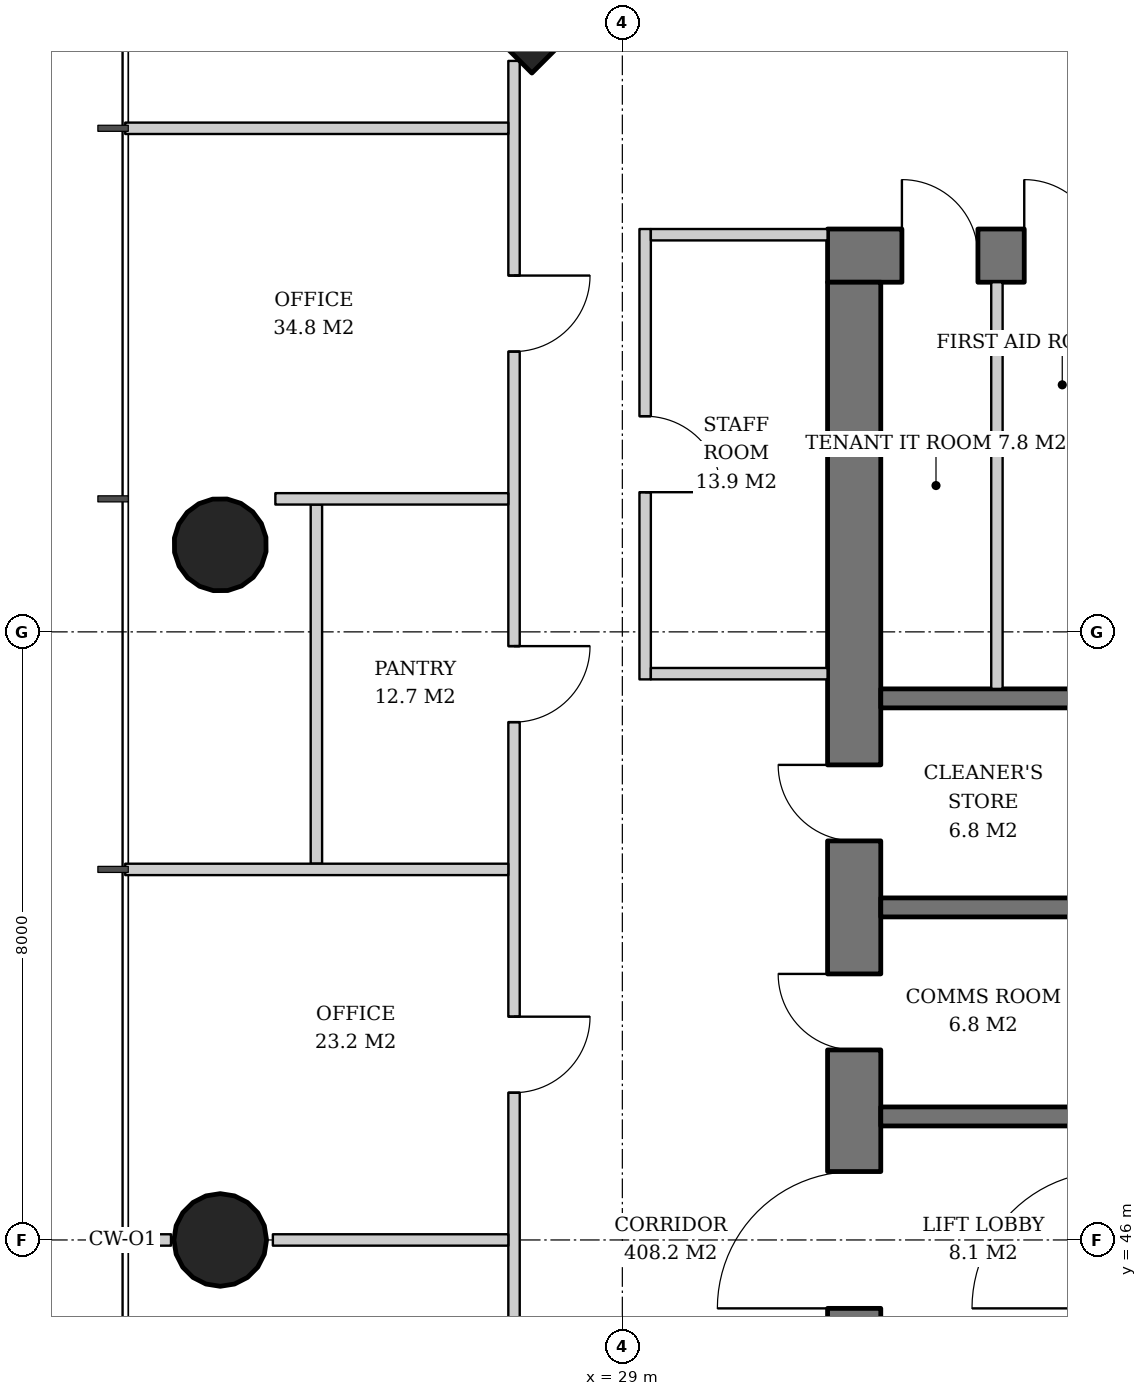
"""IFC4 building model, lengths in metres.
Left out: names, types, materials, properties, quantities, classifications, styles, units other than length and angle.
Written with IfcOpenShell. Run it as: python <this file> out.ifc"""

import sys

from ifc_helpers import new_model, si_unit, direction, frame, frame_2d, origin, origin_2d, place, context, subcontext, project, spatial, rectangle, hollow_circle, extrude, element, fill, save


model = new_model("IFC4")
c1 = context("Model", 3, precision=1e-05, world=origin(), true_north=direction((0.0, 1.0)))
c2 = subcontext(c1, "Body", "Model", "MODEL_VIEW")
j1 = project(units=[si_unit("LENGTHUNIT", "METRE"), si_unit("PLANEANGLEUNIT", "RADIAN")], contexts=[c1])
p1 = place(None, origin())
s1 = spatial("IfcSite", under=j1, at=p1, CompositionType="ELEMENT")
p2 = place(p1, origin())
s2 = spatial("IfcBuilding", under=s1, at=p2, CompositionType="ELEMENT")
p3 = place(p2, frame((0.0, 0.0, 104.6)))
s3 = spatial("IfcBuildingStorey", under=s2, at=p3, CompositionType="ELEMENT", Elevation=104.6)
p4 = place(p3, frame((27.771, 63.229, 0.0), z_axis=(0.031900153262, -0.031900153262, 0.998981861919), x_axis=(0.707106781187, 0.707106781187, 0.0)))
e1 = element("IfcColumn", 1, at=p4, inside=s3, PredefinedType="COLUMN", context=c2, shape_type="SweptSolid", body=[
    extrude(rectangle(XDim=2.6, YDim=2.6, at=origin_2d()), origin(), (0.0, 0.0, 1.0), 3.804),
])
p5 = place(p3, frame((23.671, 55.164, 0.0), z_axis=(0.031976461511, -0.015988230756, 0.999360736865), x_axis=(0.4472135955, 0.894427191, 0.0)))
e2 = element("IfcColumn", 2, at=p5, inside=s3, PredefinedType="COLUMN", context=c2, shape_type="SweptSolid", body=[
    extrude(hollow_circle(Radius=0.61, WallThickness=0.04, at=origin_2d()), origin(), (0.0, 0.0, 1.0), 3.802),
])
p6 = place(p3, frame((23.671, 46.0, 0.0), z_axis=(0.031980549263, 0.0, 0.999488491414), x_axis=(0.0, 1.0, 0.0)))
e3 = element("IfcColumn", 3, at=p6, inside=s3, PredefinedType="COLUMN", context=c2, shape_type="SweptSolid", body=[
    extrude(hollow_circle(Radius=0.61, WallThickness=0.04, at=origin_2d()), origin(), (0.0, 0.0, 1.0), 3.802),
])
p7 = place(p3, frame((31.7, 58.95, 0.0), z_axis=(0.0, 0.0, 1.0), x_axis=(1.0, 0.0, 0.0)))
e4 = element("IfcWall", 4, at=p7, inside=s3, PredefinedType="SHEAR", context=c2, shape_type="SweptSolid", body=[
    extrude(rectangle(XDim=26.6, YDim=0.7, at=frame_2d((13.3, 0.0))), origin(), (0.0, 0.0, 1.0), 3.8),
])
p8 = place(p7, frame((17.94, 0.0, 0.0)))
e5 = element("IfcOpeningElement", 5, at=p8, cuts=e4, PredefinedType="OPENING", context=c2, shape_type="SweptSolid", body=[
    extrude(rectangle(XDim=1.0, YDim=2.1, at=frame_2d((0.5, 1.05))), frame((0.0, 0.36, 0.0), z_axis=(0.0, -1.0, 0.0), x_axis=(1.0, 0.0, 0.0)), (0.0, 0.0, 1.0), 0.72),
])
p9 = place(p7, frame((5.825, 0.0, 0.0)))
e6 = element("IfcOpeningElement", 6, at=p9, cuts=e4, PredefinedType="OPENING", context=c2, shape_type="SweptSolid", body=[
    extrude(rectangle(XDim=1.0, YDim=2.1, at=frame_2d((0.5, 1.05))), frame((0.0, 0.36, 0.0), z_axis=(0.0, -1.0, 0.0), x_axis=(1.0, 0.0, 0.0)), (0.0, 0.0, 1.0), 0.72),
])
p10 = place(p7, frame((0.978, 0.0, 0.0)))
e7 = element("IfcOpeningElement", 7, at=p10, cuts=e4, PredefinedType="OPENING", context=c2, shape_type="SweptSolid", body=[
    extrude(rectangle(XDim=1.0, YDim=2.1, at=frame_2d((0.5, 1.05))), frame((0.0, 0.36, 0.0), z_axis=(0.0, -1.0, 0.0), x_axis=(1.0, 0.0, 0.0)), (0.0, 0.0, 1.0), 0.72),
])
p11 = place(p7, frame((2.587, 0.0, 0.0)))
e8 = element("IfcOpeningElement", 8, at=p11, cuts=e4, PredefinedType="OPENING", context=c2, shape_type="SweptSolid", body=[
    extrude(rectangle(XDim=1.0, YDim=2.1, at=frame_2d((0.5, 1.05))), frame((0.0, 0.36, 0.0), z_axis=(0.0, -1.0, 0.0), x_axis=(1.0, 0.0, 0.0)), (0.0, 0.0, 1.0), 0.72),
])
p12 = place(p7, frame((4.211, 0.0, 0.0)))
e9 = element("IfcOpeningElement", 9, at=p12, cuts=e4, PredefinedType="OPENING", context=c2, shape_type="SweptSolid", body=[
    extrude(rectangle(XDim=1.0, YDim=2.1, at=frame_2d((0.5, 1.05))), frame((0.0, 0.36, 0.0), z_axis=(0.0, -1.0, 0.0), x_axis=(1.0, 0.0, 0.0)), (0.0, 0.0, 1.0), 0.72),
])
p13 = place(p7, frame((9.126, 0.0, 0.0)))
e10 = element("IfcOpeningElement", 10, at=p13, cuts=e4, PredefinedType="OPENING", context=c2, shape_type="SweptSolid", body=[
    extrude(rectangle(XDim=1.0, YDim=2.1, at=frame_2d((0.5, 1.05))), frame((0.0, 0.36, 0.0), z_axis=(0.0, -1.0, 0.0), x_axis=(1.0, 0.0, 0.0)), (0.0, 0.0, 1.0), 0.72),
])
p14 = place(p7, frame((14.029, 0.0, 0.0)))
e11 = element("IfcOpeningElement", 11, at=p14, cuts=e4, PredefinedType="OPENING", context=c2, shape_type="SweptSolid", body=[
    extrude(rectangle(XDim=1.0, YDim=2.1, at=frame_2d((0.5, 1.05))), frame((0.0, 0.36, 0.0), z_axis=(0.0, -1.0, 0.0), x_axis=(1.0, 0.0, 0.0)), (0.0, 0.0, 1.0), 0.72),
])
p15 = place(p7, frame((22.4, 0.0, 0.0)))
e12 = element("IfcOpeningElement", 12, at=p15, cuts=e4, PredefinedType="OPENING", context=c2, shape_type="SweptSolid", body=[
    extrude(rectangle(XDim=1.0, YDim=2.1, at=frame_2d((0.5, 1.05))), frame((0.0, 0.36, 0.0), z_axis=(0.0, -1.0, 0.0), x_axis=(1.0, 0.0, 0.0)), (0.0, 0.0, 1.0), 0.72),
])
p16 = place(p3, frame((32.05, 33.4, 0.0), z_axis=(0.0, 0.0, 1.0), x_axis=(0.0, 1.0, 0.0)))
e13 = element("IfcWall", 13, at=p16, inside=s3, PredefinedType="SHEAR", context=c2, shape_type="SweptSolid", body=[
    extrude(rectangle(XDim=25.2, YDim=0.7, at=frame_2d((12.6, 0.0))), origin(), (0.0, 0.0, 1.0), 3.8),
])
p17 = place(p16, frame((11.7, 0.0, 0.0)))
e14 = element("IfcOpeningElement", 14, at=p17, cuts=e13, PredefinedType="OPENING", context=c2, shape_type="SweptSolid", body=[
    extrude(rectangle(XDim=1.8, YDim=2.4, at=frame_2d((0.9, 1.2))), frame((0.0, 0.36, 0.0), z_axis=(0.0, -1.0, 0.0), x_axis=(1.0, 0.0, 0.0)), (0.0, 0.0, 1.0), 0.72),
])
p18 = place(p16, frame((3.6, 0.0, 0.0)))
e15 = element("IfcOpeningElement", 15, at=p18, cuts=e13, PredefinedType="OPENING", context=c2, shape_type="SweptSolid", body=[
    extrude(rectangle(XDim=1.0, YDim=2.1, at=frame_2d((0.5, 1.05))), frame((0.0, 0.36, 0.0), z_axis=(0.0, -1.0, 0.0), x_axis=(1.0, 0.0, 0.0)), (0.0, 0.0, 1.0), 0.72),
])
p19 = place(p16, frame((6.35, 0.0, 0.0)))
e16 = element("IfcOpeningElement", 16, at=p19, cuts=e13, PredefinedType="OPENING", context=c2, shape_type="SweptSolid", body=[
    extrude(rectangle(XDim=1.0, YDim=2.1, at=frame_2d((0.5, 1.05))), frame((0.0, 0.36, 0.0), z_axis=(0.0, -1.0, 0.0), x_axis=(1.0, 0.0, 0.0)), (0.0, 0.0, 1.0), 0.72),
])
p20 = place(p16, frame((9.1, 0.0, 0.0)))
e17 = element("IfcOpeningElement", 17, at=p20, cuts=e13, PredefinedType="OPENING", context=c2, shape_type="SweptSolid", body=[
    extrude(rectangle(XDim=1.0, YDim=2.1, at=frame_2d((0.5, 1.05))), frame((0.0, 0.36, 0.0), z_axis=(0.0, -1.0, 0.0), x_axis=(1.0, 0.0, 0.0)), (0.0, 0.0, 1.0), 0.72),
])
p21 = place(p16, frame((15.1, 0.0, 0.0)))
e18 = element("IfcOpeningElement", 18, at=p21, cuts=e13, PredefinedType="OPENING", context=c2, shape_type="SweptSolid", body=[
    extrude(rectangle(XDim=1.0, YDim=2.1, at=frame_2d((0.5, 1.05))), frame((0.0, 0.36, 0.0), z_axis=(0.0, -1.0, 0.0), x_axis=(1.0, 0.0, 0.0)), (0.0, 0.0, 1.0), 0.72),
])
p22 = place(p16, frame((17.85, 0.0, 0.0)))
e19 = element("IfcOpeningElement", 19, at=p22, cuts=e13, PredefinedType="OPENING", context=c2, shape_type="SweptSolid", body=[
    extrude(rectangle(XDim=1.0, YDim=2.1, at=frame_2d((0.5, 1.05))), frame((0.0, 0.36, 0.0), z_axis=(0.0, -1.0, 0.0), x_axis=(1.0, 0.0, 0.0)), (0.0, 0.0, 1.0), 0.72),
])
for number, where, z_axis, x_axis in (
    (20, (32.4, 47.625, 0.0), (0.0, 0.0, 1.0), (1.0, 0.0, 0.0)),
    (21, (32.4, 50.375, 0.0), (0.0, 0.0, 1.0), (1.0, 0.0, 0.0)),
    (22, (32.4, 53.125, 0.0), (0.0, 0.0, 1.0), (1.0, 0.0, 0.0)),
):
    element("IfcWall", number, at=place(p3, frame(where, z_axis=z_axis, x_axis=x_axis)), inside=s3, PredefinedType="SHEAR", context=c2, shape_type="SweptSolid", body=[
        extrude(rectangle(XDim=2.7, YDim=0.25, at=frame_2d((1.35, 0.0))), origin(), (0.0, 0.0, 1.0), 3.8),
    ])
p23 = place(p3, frame((33.928, 53.25, 0.0), z_axis=(0.0, 0.0, 1.0), x_axis=(0.0, 1.0, 0.0)))
e23 = element("IfcWall", 23, at=p23, inside=s3, PredefinedType="SOLIDWALL", context=c2, shape_type="SweptSolid", body=[
    extrude(rectangle(XDim=5.35, YDim=0.15, at=frame_2d((2.675, 0.0))), origin(), (0.0, 0.0, 1.0), 3.62),
])
p24 = place(p3, frame((29.3, 59.3, 0.0), z_axis=(0.0, 0.0, 1.0), x_axis=(0.0, -1.0, 0.0)))
e24 = element("IfcWall", 24, at=p24, inside=s3, PredefinedType="PARTITIONING", context=c2, shape_type="SweptSolid", body=[
    extrude(rectangle(XDim=5.925, YDim=0.15, at=frame_2d((2.962, 0.0))), origin(), (0.0, 0.0, 1.0), 2.72),
])
p25 = place(p24, frame((2.462, 0.0, 0.0)))
e25 = element("IfcOpeningElement", 25, at=p25, cuts=e24, PredefinedType="OPENING", context=c2, shape_type="SweptSolid", body=[
    extrude(rectangle(XDim=1.0, YDim=2.1, at=frame_2d((0.5, 1.05))), frame((0.0, 0.085, 0.0), z_axis=(0.0, -1.0, 0.0), x_axis=(1.0, 0.0, 0.0)), (0.0, 0.0, 1.0), 0.17),
])
for number, where, z_axis, x_axis in (
    (26, (31.7, 59.225, 0.0), (0.0, 0.0, 1.0), (-1.0, 0.0, 0.0)),
    (27, (31.7, 53.45, 0.0), (0.0, 0.0, 1.0), (-1.0, 0.0, 0.0)),
):
    element("IfcWall", number, at=place(p3, frame(where, z_axis=z_axis, x_axis=x_axis)), inside=s3, PredefinedType="PARTITIONING", context=c2, shape_type="SweptSolid", body=[
        extrude(rectangle(XDim=2.325, YDim=0.15, at=frame_2d((1.163, 0.0))), origin(), (0.0, 0.0, 1.0), 3.62),
    ])
p26 = place(p3, frame((24.975, 55.675, 0.0), z_axis=(0.0, 0.0, 1.0), x_axis=(0.0, -1.0, 0.0)))
e28 = element("IfcWall", 28, at=p26, inside=s3, PredefinedType="PARTITIONING", context=c2, shape_type="SweptSolid", body=[
    extrude(rectangle(XDim=4.725, YDim=0.15, at=frame_2d((2.363, 0.0))), origin(), (0.0, 0.0, 1.0), 2.858),
])
p27 = place(p3, frame((27.575, 61.511, 0.0), z_axis=(0.0, 0.0, 1.0), x_axis=(0.0, -1.0, 0.0)))
e29 = element("IfcWall", 29, at=p27, inside=s3, PredefinedType="PARTITIONING", context=c2, shape_type="SweptSolid", body=[
    extrude(rectangle(XDim=31.023, YDim=0.15, at=frame_2d((15.511, 0.0))), origin(), (0.0, 0.0, 1.0), 2.72),
])
p28 = place(p27, frame((2.824, 0.0, 0.0)))
e30 = element("IfcOpeningElement", 30, at=p28, cuts=e29, PredefinedType="OPENING", context=c2, shape_type="SweptSolid", body=[
    extrude(rectangle(XDim=1.0, YDim=2.1, at=frame_2d((0.5, 1.05))), frame((0.0, 0.085, 0.0), z_axis=(0.0, -1.0, 0.0), x_axis=(1.0, 0.0, 0.0)), (0.0, 0.0, 1.0), 0.17),
])
p29 = place(p27, frame((7.699, 0.0, 0.0)))
e31 = element("IfcOpeningElement", 31, at=p29, cuts=e29, PredefinedType="OPENING", context=c2, shape_type="SweptSolid", body=[
    extrude(rectangle(XDim=1.0, YDim=2.1, at=frame_2d((0.5, 1.05))), frame((0.0, 0.085, 0.0), z_axis=(0.0, -1.0, 0.0), x_axis=(1.0, 0.0, 0.0)), (0.0, 0.0, 1.0), 0.17),
])
p30 = place(p27, frame((12.574, 0.0, 0.0)))
e32 = element("IfcOpeningElement", 32, at=p30, cuts=e29, PredefinedType="OPENING", context=c2, shape_type="SweptSolid", body=[
    extrude(rectangle(XDim=1.0, YDim=2.1, at=frame_2d((0.5, 1.05))), frame((0.0, 0.085, 0.0), z_axis=(0.0, -1.0, 0.0), x_axis=(1.0, 0.0, 0.0)), (0.0, 0.0, 1.0), 0.17),
])
p31 = place(p27, frame((17.549, 0.0, 0.0)))
e33 = element("IfcOpeningElement", 33, at=p31, cuts=e29, PredefinedType="OPENING", context=c2, shape_type="SweptSolid", body=[
    extrude(rectangle(XDim=0.8, YDim=2.1, at=frame_2d((0.4, 1.05))), frame((0.0, 0.085, 0.0), z_axis=(0.0, -1.0, 0.0), x_axis=(1.0, 0.0, 0.0)), (0.0, 0.0, 1.0), 0.17),
])
p32 = place(p27, frame((22.324, 0.0, 0.0)))
e34 = element("IfcOpeningElement", 34, at=p32, cuts=e29, PredefinedType="OPENING", context=c2, shape_type="SweptSolid", body=[
    extrude(rectangle(XDim=1.0, YDim=2.1, at=frame_2d((0.5, 1.05))), frame((0.0, 0.085, 0.0), z_axis=(0.0, -1.0, 0.0), x_axis=(1.0, 0.0, 0.0)), (0.0, 0.0, 1.0), 0.17),
])
p33 = place(p27, frame((27.299, 0.0, 0.0)))
e35 = element("IfcOpeningElement", 35, at=p33, cuts=e29, PredefinedType="OPENING", context=c2, shape_type="SweptSolid", body=[
    extrude(rectangle(XDim=0.8, YDim=2.1, at=frame_2d((0.4, 1.05))), frame((0.0, 0.085, 0.0), z_axis=(0.0, -1.0, 0.0), x_axis=(1.0, 0.0, 0.0)), (0.0, 0.0, 1.0), 0.17),
])
p34 = place(p3, frame((27.5, 60.625, 0.0), z_axis=(0.0, 0.0, 1.0), x_axis=(-1.0, 0.0, 0.0)))
e36 = element("IfcWall", 36, at=p34, inside=s3, PredefinedType="PARTITIONING", context=c2, shape_type="SweptSolid", body=[
    extrude(rectangle(XDim=5.04, YDim=0.15, at=frame_2d((2.52, 0.0))), origin(), (0.0, 0.0, 1.0), 2.82),
])
p35 = place(p3, frame((27.5, 55.75, 0.0), z_axis=(0.0, 0.0, 1.0), x_axis=(-1.0, 0.0, 0.0)))
e37 = element("IfcWall", 37, at=p35, inside=s3, PredefinedType="PARTITIONING", context=c2, shape_type="SweptSolid", body=[
    extrude(rectangle(XDim=3.065, YDim=0.15, at=frame_2d((1.532, 0.0))), origin(), (0.0, 0.0, 1.0), 3.62),
])
p36 = place(p3, frame((27.5, 50.875, 0.0), z_axis=(0.0, 0.0, 1.0), x_axis=(-1.0, 0.0, 0.0)))
e38 = element("IfcWall", 38, at=p36, inside=s3, PredefinedType="PARTITIONING", context=c2, shape_type="SweptSolid", body=[
    extrude(rectangle(XDim=5.04, YDim=0.15, at=frame_2d((2.52, 0.0))), origin(), (0.0, 0.0, 1.0), 2.82),
])
p37 = place(p3, frame((27.5, 46.0, 0.0), z_axis=(0.0, 0.0, 1.0), x_axis=(-1.0, 0.0, 0.0)))
e39 = element("IfcWall", 39, at=p37, inside=s3, PredefinedType="PARTITIONING", context=c2, shape_type="SweptSolid", body=[
    extrude(rectangle(XDim=3.098, YDim=0.15, at=frame_2d((1.549, 0.0))), origin(), (0.0, 0.0, 1.0), 2.858),
])
p38 = place(p3, frame((23.062, 46.0, 0.0), z_axis=(0.0, 0.0, 1.0), x_axis=(-1.0, 0.0, 0.0)))
e40 = element("IfcWall", 40, at=p38, inside=s3, PredefinedType="PARTITIONING", context=c2, shape_type="SweptSolid", body=[
    extrude(rectangle(XDim=0.602, YDim=0.15, at=frame_2d((0.301, 0.0))), origin(), (0.0, 0.0, 1.0), 3.62),
])
p39 = place(p17, origin())
e41 = element("IfcDoor", 41, at=p39, inside=s3, OperationType="DOUBLE_DOOR_SINGLE_SWING", PredefinedType="DOOR", context=c2, shape_type="SweptSolid", body=[
    extrude(rectangle(XDim=1.8, YDim=2.4, at=frame_2d((0.9, 1.2))), frame((0.0, 0.025, 0.0), z_axis=(0.0, -1.0, 0.0), x_axis=(1.0, 0.0, 0.0)), (0.0, 0.0, 1.0), 0.05),
])
fill(e14, e41)
p40 = place(p21, origin())
e42 = element("IfcDoor", 42, at=p40, inside=s3, OperationType="SINGLE_SWING_RIGHT", PredefinedType="DOOR", context=c2, shape_type="SweptSolid", body=[
    extrude(rectangle(XDim=1.0, YDim=2.1, at=frame_2d((0.5, 1.05))), frame((0.0, -0.29, 0.0), z_axis=(0.0, -1.0, 0.0), x_axis=(1.0, 0.0, 0.0)), (0.0, 0.0, 1.0), 0.05),
])
fill(e18, e42)
p41 = place(p22, origin())
e43 = element("IfcDoor", 43, at=p41, inside=s3, OperationType="SINGLE_SWING_RIGHT", PredefinedType="DOOR", context=c2, shape_type="SweptSolid", body=[
    extrude(rectangle(XDim=1.0, YDim=2.1, at=frame_2d((0.5, 1.05))), frame((0.0, -0.29, 0.0), z_axis=(0.0, -1.0, 0.0), x_axis=(1.0, 0.0, 0.0)), (0.0, 0.0, 1.0), 0.05),
])
fill(e19, e43)
p42 = place(p10, origin())
e44 = element("IfcDoor", 44, at=p42, inside=s3, OperationType="SINGLE_SWING_LEFT", PredefinedType="DOOR", context=c2, shape_type="SweptSolid", body=[
    extrude(rectangle(XDim=1.0, YDim=2.1, at=frame_2d((0.5, 1.05))), frame((0.0, -0.29, 0.0), z_axis=(0.0, -1.0, 0.0), x_axis=(1.0, 0.0, 0.0)), (0.0, 0.0, 1.0), 0.05),
])
fill(e7, e44)
p43 = place(p11, origin())
e45 = element("IfcDoor", 45, at=p43, inside=s3, OperationType="SINGLE_SWING_LEFT", PredefinedType="DOOR", context=c2, shape_type="SweptSolid", body=[
    extrude(rectangle(XDim=1.0, YDim=2.1, at=frame_2d((0.5, 1.05))), frame((0.0, -0.29, 0.0), z_axis=(0.0, -1.0, 0.0), x_axis=(1.0, 0.0, 0.0)), (0.0, 0.0, 1.0), 0.05),
])
fill(e8, e45)
p44 = place(p25, origin())
e46 = element("IfcDoor", 46, at=p44, inside=s3, OperationType="SINGLE_SWING_RIGHT", PredefinedType="DOOR", context=c2, shape_type="SweptSolid", body=[
    extrude(rectangle(XDim=1.0, YDim=2.1, at=frame_2d((0.5, 1.05))), frame((0.0, 0.025, 0.0), z_axis=(0.0, -1.0, 0.0), x_axis=(1.0, 0.0, 0.0)), (0.0, 0.0, 1.0), 0.05),
])
fill(e25, e46)
p45 = place(p28, origin())
e47 = element("IfcDoor", 47, at=p45, inside=s3, OperationType="SINGLE_SWING_LEFT", PredefinedType="DOOR", context=c2, shape_type="SweptSolid", body=[
    extrude(rectangle(XDim=1.0, YDim=2.1, at=frame_2d((0.5, 1.05))), frame((0.0, 0.025, 0.0), z_axis=(0.0, -1.0, 0.0), x_axis=(1.0, 0.0, 0.0)), (0.0, 0.0, 1.0), 0.05),
])
fill(e30, e47)
p46 = place(p29, origin())
e48 = element("IfcDoor", 48, at=p46, inside=s3, OperationType="SINGLE_SWING_LEFT", PredefinedType="DOOR", context=c2, shape_type="SweptSolid", body=[
    extrude(rectangle(XDim=1.0, YDim=2.1, at=frame_2d((0.5, 1.05))), frame((0.0, 0.025, 0.0), z_axis=(0.0, -1.0, 0.0), x_axis=(1.0, 0.0, 0.0)), (0.0, 0.0, 1.0), 0.05),
])
fill(e31, e48)
p47 = place(p30, origin())
e49 = element("IfcDoor", 49, at=p47, inside=s3, OperationType="SINGLE_SWING_LEFT", PredefinedType="DOOR", context=c2, shape_type="SweptSolid", body=[
    extrude(rectangle(XDim=1.0, YDim=2.1, at=frame_2d((0.5, 1.05))), frame((0.0, 0.025, 0.0), z_axis=(0.0, -1.0, 0.0), x_axis=(1.0, 0.0, 0.0)), (0.0, 0.0, 1.0), 0.05),
])
fill(e32, e49)
save(model, sys.argv[1])
